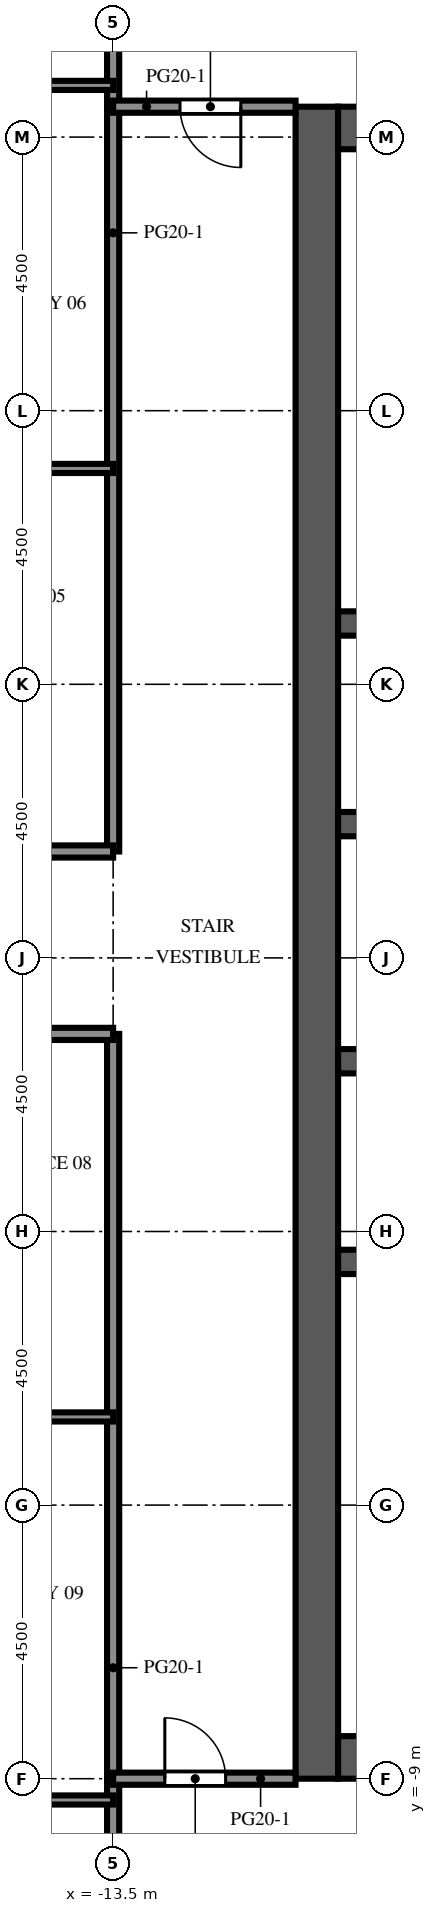
"""IFC4 building model, lengths in metres.
Left out: names, types, materials, properties, quantities, classifications, styles, units other than length and angle.
Written with IfcOpenShell. Run it as: python <this file> out.ifc"""

import sys

from ifc_helpers import new_model, si_unit, direction, frame, frame_2d, origin, place, context, subcontext, project, spatial, rectangle, extrude, element, fill, save


model = new_model("IFC4")
c1 = context("Model", 3, precision=1e-05, world=origin(), true_north=direction((0.0, 1.0)))
c2 = subcontext(c1, "Body", "Model", "MODEL_VIEW")
j1 = project(units=[si_unit("LENGTHUNIT", "METRE"), si_unit("PLANEANGLEUNIT", "RADIAN")], contexts=[c1])
p1 = place(None, origin())
s1 = spatial("IfcSite", under=j1, at=p1, CompositionType="ELEMENT")
p2 = place(p1, origin())
s2 = spatial("IfcBuilding", under=s1, at=p2, CompositionType="ELEMENT")
p3 = place(p2, frame((0.0, 0.0, 282.7)))
s3 = spatial("IfcBuildingStorey", under=s2, at=p3, CompositionType="ELEMENT", Elevation=282.7)
p4 = place(p3, frame((-10.15, -9.0, 0.0), z_axis=(0.0, 0.0, 1.0), x_axis=(0.0, 1.0, 0.0)))
e1 = element("IfcWall", 1, at=p4, inside=s3, PredefinedType="SHEAR", context=c2, shape_type="SweptSolid", body=[
    extrude(rectangle(XDim=27.5, YDim=0.7, at=frame_2d((13.75, 0.0))), origin(), (0.0, 0.0, 1.0), 4.1),
])
p5 = place(p4, frame((12.55, 0.0, 0.0)))
e2 = element("IfcOpeningElement", 2, at=p5, cuts=e1, PredefinedType="OPENING", context=c2, shape_type="SweptSolid", body=[
    extrude(rectangle(XDim=2.4, YDim=2.4, at=frame_2d((1.2, 1.2))), frame((0.0, 0.36, 0.0), z_axis=(0.0, -1.0, 0.0), x_axis=(1.0, 0.0, 0.0)), (0.0, 0.0, 1.0), 0.72),
])
p6 = place(p4, frame((6.825, 0.0, 0.0)))
e3 = element("IfcOpeningElement", 3, at=p6, cuts=e1, PredefinedType="OPENING", context=c2, shape_type="SweptSolid", body=[
    extrude(rectangle(XDim=1.2, YDim=2.1, at=frame_2d((0.6, 1.05))), frame((0.0, 0.36, 0.0), z_axis=(0.0, -1.0, 0.0), x_axis=(1.0, 0.0, 0.0)), (0.0, 0.0, 1.0), 0.72),
])
p7 = place(p4, frame((19.475, 0.0, 0.0)))
e4 = element("IfcOpeningElement", 4, at=p7, cuts=e1, PredefinedType="OPENING", context=c2, shape_type="SweptSolid", body=[
    extrude(rectangle(XDim=1.2, YDim=2.1, at=frame_2d((0.6, 1.05))), frame((0.0, 0.36, 0.0), z_axis=(0.0, -1.0, 0.0), x_axis=(1.0, 0.0, 0.0)), (0.0, 0.0, 1.0), 0.72),
])
for number, where, z_axis, x_axis in (
    (5, (-9.8, -8.65, 0.0), (0.0, 0.0, 1.0), (1.0, 0.0, 0.0)),
    (6, (-9.8, 18.15, 0.0), (0.0, 0.0, 1.0), (1.0, 0.0, 0.0)),
):
    element("IfcWall", number, at=place(p3, frame(where, z_axis=z_axis, x_axis=x_axis)), inside=s3, PredefinedType="SHEAR", context=c2, shape_type="SweptSolid", body=[
        extrude(rectangle(XDim=10.6, YDim=0.7, at=frame_2d((5.3, 0.0))), origin(), (0.0, 0.0, 1.0), 4.1),
    ])
p8 = place(p3, frame((-9.8, -0.5, 0.0), z_axis=(0.0, 0.0, 1.0), x_axis=(1.0, 0.0, 0.0)))
e7 = element("IfcWall", 7, at=p8, inside=s3, PredefinedType="SHEAR", context=c2, shape_type="SweptSolid", body=[
    extrude(rectangle(XDim=10.6, YDim=0.4, at=frame_2d((5.3, 0.0))), origin(), (0.0, 0.0, 1.0), 4.1),
])
p9 = place(p3, frame((-9.8, 2.8, 0.0), z_axis=(0.0, 0.0, 1.0), x_axis=(1.0, 0.0, 0.0)))
e8 = element("IfcWall", 8, at=p9, inside=s3, PredefinedType="SHEAR", context=c2, shape_type="SweptSolid", body=[
    extrude(rectangle(XDim=10.6, YDim=0.4, at=frame_2d((5.3, 0.0))), origin(), (0.0, 0.0, 1.0), 4.1),
])
p10 = place(p9, frame((0.688, 0.0, 0.0)))
e9 = element("IfcOpeningElement", 9, at=p10, cuts=e8, PredefinedType="OPENING", context=c2, shape_type="SweptSolid", body=[
    extrude(rectangle(XDim=1.1, YDim=2.1, at=frame_2d((0.55, 1.05))), frame((0.0, 0.21, 0.0), z_axis=(0.0, -1.0, 0.0), x_axis=(1.0, 0.0, 0.0)), (0.0, 0.0, 1.0), 0.42),
])
p11 = place(p9, frame((3.438, 0.0, 0.0)))
e10 = element("IfcOpeningElement", 10, at=p11, cuts=e8, PredefinedType="OPENING", context=c2, shape_type="SweptSolid", body=[
    extrude(rectangle(XDim=1.1, YDim=2.1, at=frame_2d((0.55, 1.05))), frame((0.0, 0.21, 0.0), z_axis=(0.0, -1.0, 0.0), x_axis=(1.0, 0.0, 0.0)), (0.0, 0.0, 1.0), 0.42),
])
p12 = place(p9, frame((6.113, 0.0, 0.0)))
e11 = element("IfcOpeningElement", 11, at=p12, cuts=e8, PredefinedType="OPENING", context=c2, shape_type="SweptSolid", body=[
    extrude(rectangle(XDim=1.0, YDim=2.1, at=frame_2d((0.5, 1.05))), frame((0.0, 0.21, 0.0), z_axis=(0.0, -1.0, 0.0), x_axis=(1.0, 0.0, 0.0)), (0.0, 0.0, 1.0), 0.42),
])
p13 = place(p9, frame((8.863, 0.0, 0.0)))
e12 = element("IfcOpeningElement", 12, at=p13, cuts=e8, PredefinedType="OPENING", context=c2, shape_type="SweptSolid", body=[
    extrude(rectangle(XDim=1.0, YDim=2.1, at=frame_2d((0.5, 1.05))), frame((0.0, 0.21, 0.0), z_axis=(0.0, -1.0, 0.0), x_axis=(1.0, 0.0, 0.0)), (0.0, 0.0, 1.0), 0.42),
])
p14 = place(p3, frame((-9.8, 6.7, 0.0), z_axis=(0.0, 0.0, 1.0), x_axis=(1.0, 0.0, 0.0)))
e13 = element("IfcWall", 13, at=p14, inside=s3, PredefinedType="SHEAR", context=c2, shape_type="SweptSolid", body=[
    extrude(rectangle(XDim=10.6, YDim=0.4, at=frame_2d((5.3, 0.0))), origin(), (0.0, 0.0, 1.0), 4.1),
])
p15 = place(p14, frame((3.438, 0.0, 0.0)))
e14 = element("IfcOpeningElement", 14, at=p15, cuts=e13, PredefinedType="OPENING", context=c2, shape_type="SweptSolid", body=[
    extrude(rectangle(XDim=1.1, YDim=2.1, at=frame_2d((0.55, 1.05))), frame((0.0, 0.21, 0.0), z_axis=(0.0, -1.0, 0.0), x_axis=(1.0, 0.0, 0.0)), (0.0, 0.0, 1.0), 0.42),
])
p16 = place(p14, frame((6.062, 0.0, 0.0)))
e15 = element("IfcOpeningElement", 15, at=p16, cuts=e13, PredefinedType="OPENING", context=c2, shape_type="SweptSolid", body=[
    extrude(rectangle(XDim=1.1, YDim=2.1, at=frame_2d((0.55, 1.05))), frame((0.0, 0.21, 0.0), z_axis=(0.0, -1.0, 0.0), x_axis=(1.0, 0.0, 0.0)), (0.0, 0.0, 1.0), 0.42),
])
p17 = place(p14, frame((8.812, 0.0, 0.0)))
e16 = element("IfcOpeningElement", 16, at=p17, cuts=e13, PredefinedType="OPENING", context=c2, shape_type="SweptSolid", body=[
    extrude(rectangle(XDim=1.1, YDim=2.1, at=frame_2d((0.55, 1.05))), frame((0.0, 0.21, 0.0), z_axis=(0.0, -1.0, 0.0), x_axis=(1.0, 0.0, 0.0)), (0.0, 0.0, 1.0), 0.42),
])
p18 = place(p14, frame((0.738, 0.0, 0.0)))
e17 = element("IfcOpeningElement", 17, at=p18, cuts=e13, PredefinedType="OPENING", context=c2, shape_type="SweptSolid", body=[
    extrude(rectangle(XDim=1.0, YDim=2.1, at=frame_2d((0.5, 1.05))), frame((0.0, 0.21, 0.0), z_axis=(0.0, -1.0, 0.0), x_axis=(1.0, 0.0, 0.0)), (0.0, 0.0, 1.0), 0.42),
])
p19 = place(p3, frame((-9.8, 10.0, 0.0), z_axis=(0.0, 0.0, 1.0), x_axis=(1.0, 0.0, 0.0)))
e18 = element("IfcWall", 18, at=p19, inside=s3, PredefinedType="SHEAR", context=c2, shape_type="SweptSolid", body=[
    extrude(rectangle(XDim=10.6, YDim=0.4, at=frame_2d((5.3, 0.0))), origin(), (0.0, 0.0, 1.0), 4.1),
])
p20 = place(p3, frame((-13.5, -17.6, 0.0), z_axis=(0.0, 0.0, 1.0), x_axis=(0.0, 1.0, 0.0)))
e19 = element("IfcWall", 19, at=p20, inside=s3, PredefinedType="PARTITIONING", context=c2, shape_type="SweptSolid", body=[
    extrude(rectangle(XDim=20.85, YDim=0.2, at=frame_2d((10.425, 0.0))), origin(), (0.0, 0.0, 1.0), 3.65),
])
p21 = place(p3, frame((-13.5, 6.25, 0.0), z_axis=(0.0, 0.0, 1.0), x_axis=(0.0, 1.0, 0.0)))
e20 = element("IfcWall", 20, at=p21, inside=s3, PredefinedType="PARTITIONING", context=c2, shape_type="SweptSolid", body=[
    extrude(rectangle(XDim=20.35, YDim=0.2, at=frame_2d((10.175, 0.0))), origin(), (0.0, 0.0, 1.0), 3.65),
])
p22 = place(p3, frame((-17.5, -9.35, 0.0), z_axis=(0.0, 0.0, 1.0), x_axis=(1.0, 0.0, 0.0)))
e21 = element("IfcWall", 21, at=p22, inside=s3, PredefinedType="PARTITIONING", context=c2, shape_type="SweptSolid", body=[
    extrude(rectangle(XDim=4.0, YDim=0.15, at=frame_2d((2.0, 0.0))), origin(), (0.0, 0.0, 1.0), 3.65),
])
p23 = place(p3, frame((-10.5, -9.0, 0.0), z_axis=(0.0, 0.0, 1.0), x_axis=(-1.0, 0.0, 0.0)))
e22 = element("IfcWall", 22, at=p23, inside=s3, PredefinedType="PARTITIONING", context=c2, shape_type="SweptSolid", body=[
    extrude(rectangle(XDim=3.0, YDim=0.2, at=frame_2d((1.5, 0.0))), origin(), (0.0, 0.0, 1.0), 3.65),
])
p24 = place(p23, frame((1.15, 0.0, 0.0)))
e23 = element("IfcOpeningElement", 23, at=p24, cuts=e22, PredefinedType="OPENING", context=c2, shape_type="SweptSolid", body=[
    extrude(rectangle(XDim=1.0, YDim=2.1, at=frame_2d((0.5, 1.05))), frame((0.0, 0.11, 0.0), z_axis=(0.0, -1.0, 0.0), x_axis=(1.0, 0.0, 0.0)), (0.0, 0.0, 1.0), 0.22),
])
p25 = place(p3, frame((-13.5, -3.05, 0.0), z_axis=(0.0, 0.0, 1.0), x_axis=(-1.0, 0.0, 0.0)))
e24 = element("IfcWall", 24, at=p25, inside=s3, PredefinedType="PARTITIONING", context=c2, shape_type="SweptSolid", body=[
    extrude(rectangle(XDim=8.85, YDim=0.15, at=frame_2d((4.425, 0.0))), origin(), (0.0, 0.0, 1.0), 3.65),
])
p26 = place(p25, frame((5.4, 0.0, 0.0)))
e25 = element("IfcOpeningElement", 25, at=p26, cuts=e24, PredefinedType="OPENING", context=c2, shape_type="SweptSolid", body=[
    extrude(rectangle(XDim=1.0, YDim=2.1, at=frame_2d((0.5, 1.05))), frame((0.0, 0.085, 0.0), z_axis=(0.0, -1.0, 0.0), x_axis=(1.0, 0.0, 0.0)), (0.0, 0.0, 1.0), 0.17),
])
p27 = place(p3, frame((-13.5, 3.25, 0.0), z_axis=(0.0, 0.0, 1.0), x_axis=(-1.0, 0.0, 0.0)))
e26 = element("IfcWall", 26, at=p27, inside=s3, PredefinedType="PARTITIONING", context=c2, shape_type="SweptSolid", body=[
    extrude(rectangle(XDim=8.85, YDim=0.2, at=frame_2d((4.425, 0.0))), origin(), (0.0, 0.0, 1.0), 3.65),
])
p28 = place(p27, frame((5.15, 0.0, 0.0)))
e27 = element("IfcOpeningElement", 27, at=p28, cuts=e26, PredefinedType="OPENING", context=c2, shape_type="SweptSolid", body=[
    extrude(rectangle(XDim=1.0, YDim=2.1, at=frame_2d((0.5, 1.05))), frame((0.0, 0.11, 0.0), z_axis=(0.0, -1.0, 0.0), x_axis=(1.0, 0.0, 0.0)), (0.0, 0.0, 1.0), 0.22),
])
p29 = place(p3, frame((-22.35, 6.25, 0.0), z_axis=(0.0, 0.0, 1.0), x_axis=(1.0, 0.0, 0.0)))
e28 = element("IfcWall", 28, at=p29, inside=s3, PredefinedType="PARTITIONING", context=c2, shape_type="SweptSolid", body=[
    extrude(rectangle(XDim=8.85, YDim=0.2, at=frame_2d((4.425, 0.0))), origin(), (0.0, 0.0, 1.0), 3.65),
])
p30 = place(p29, frame((3.45, 0.0, 0.0)))
e29 = element("IfcOpeningElement", 29, at=p30, cuts=e28, PredefinedType="OPENING", context=c2, shape_type="SweptSolid", body=[
    extrude(rectangle(XDim=1.0, YDim=2.1, at=frame_2d((0.5, 1.05))), frame((0.0, 0.11, 0.0), z_axis=(0.0, -1.0, 0.0), x_axis=(1.0, 0.0, 0.0)), (0.0, 0.0, 1.0), 0.22),
])
p31 = place(p3, frame((-22.35, 12.55, 0.0), z_axis=(0.0, 0.0, 1.0), x_axis=(1.0, 0.0, 0.0)))
e30 = element("IfcWall", 30, at=p31, inside=s3, PredefinedType="PARTITIONING", context=c2, shape_type="SweptSolid", body=[
    extrude(rectangle(XDim=8.85, YDim=0.15, at=frame_2d((4.425, 0.0))), origin(), (0.0, 0.0, 1.0), 3.65),
])
p32 = place(p31, frame((4.2, 0.0, 0.0)))
e31 = element("IfcOpeningElement", 31, at=p32, cuts=e30, PredefinedType="OPENING", context=c2, shape_type="SweptSolid", body=[
    extrude(rectangle(XDim=1.0, YDim=2.1, at=frame_2d((0.5, 1.05))), frame((0.0, 0.085, 0.0), z_axis=(0.0, -1.0, 0.0), x_axis=(1.0, 0.0, 0.0)), (0.0, 0.0, 1.0), 0.17),
])
p33 = place(p3, frame((-13.5, 18.5, 0.0), z_axis=(0.0, 0.0, 1.0), x_axis=(1.0, 0.0, 0.0)))
e32 = element("IfcWall", 32, at=p33, inside=s3, PredefinedType="PARTITIONING", context=c2, shape_type="SweptSolid", body=[
    extrude(rectangle(XDim=3.0, YDim=0.2, at=frame_2d((1.5, 0.0))), origin(), (0.0, 0.0, 1.0), 3.65),
])
p34 = place(p33, frame((1.1, 0.0, 0.0)))
e33 = element("IfcOpeningElement", 33, at=p34, cuts=e32, PredefinedType="OPENING", context=c2, shape_type="SweptSolid", body=[
    extrude(rectangle(XDim=1.0, YDim=2.1, at=frame_2d((0.5, 1.05))), frame((0.0, 0.11, 0.0), z_axis=(0.0, -1.0, 0.0), x_axis=(1.0, 0.0, 0.0)), (0.0, 0.0, 1.0), 0.22),
])
p35 = place(p3, frame((-22.35, 18.85, 0.0), z_axis=(0.0, 0.0, 1.0), x_axis=(1.0, 0.0, 0.0)))
e34 = element("IfcWall", 34, at=p35, inside=s3, PredefinedType="PARTITIONING", context=c2, shape_type="SweptSolid", body=[
    extrude(rectangle(XDim=8.85, YDim=0.15, at=frame_2d((4.425, 0.0))), origin(), (0.0, 0.0, 1.0), 3.65),
])
p36 = place(p35, frame((2.7, 0.0, 0.0)))
e35 = element("IfcOpeningElement", 35, at=p36, cuts=e34, PredefinedType="OPENING", context=c2, shape_type="SweptSolid", body=[
    extrude(rectangle(XDim=1.0, YDim=2.1, at=frame_2d((0.5, 1.05))), frame((0.0, 0.085, 0.0), z_axis=(0.0, -1.0, 0.0), x_axis=(1.0, 0.0, 0.0)), (0.0, 0.0, 1.0), 0.17),
])
p37 = place(p5, origin())
e36 = element("IfcDoor", 36, at=p37, inside=s3, OperationType="DOUBLE_DOOR_DOUBLE_SWING", PredefinedType="DOOR", context=c2, shape_type="SweptSolid", body=[
    extrude(rectangle(XDim=2.4, YDim=2.4, at=frame_2d((1.2, 1.2))), frame((0.0, 0.025, 0.0), z_axis=(0.0, -1.0, 0.0), x_axis=(1.0, 0.0, 0.0)), (0.0, 0.0, 1.0), 0.05),
])
fill(e2, e36)
p38 = place(p6, origin())
e37 = element("IfcDoor", 37, at=p38, inside=s3, OperationType="SINGLE_SWING_LEFT", PredefinedType="DOOR", context=c2, shape_type="SweptSolid", body=[
    extrude(rectangle(XDim=1.2, YDim=2.1, at=frame_2d((0.6, 1.05))), frame((0.0, 0.025, 0.0), z_axis=(0.0, -1.0, 0.0), x_axis=(1.0, 0.0, 0.0)), (0.0, 0.0, 1.0), 0.05),
])
fill(e3, e37)
p39 = place(p7, origin())
e38 = element("IfcDoor", 38, at=p39, inside=s3, OperationType="SINGLE_SWING_LEFT", PredefinedType="DOOR", context=c2, shape_type="SweptSolid", body=[
    extrude(rectangle(XDim=1.2, YDim=2.1, at=frame_2d((0.6, 1.05))), frame((0.0, 0.025, 0.0), z_axis=(0.0, -1.0, 0.0), x_axis=(1.0, 0.0, 0.0)), (0.0, 0.0, 1.0), 0.05),
])
fill(e4, e38)
p40 = place(p24, origin())
e39 = element("IfcDoor", 39, at=p40, inside=s3, OperationType="SINGLE_SWING_RIGHT", PredefinedType="DOOR", context=c2, shape_type="SweptSolid", body=[
    extrude(rectangle(XDim=1.0, YDim=2.1, at=frame_2d((0.5, 1.05))), frame((0.0, 0.025, 0.0), z_axis=(0.0, -1.0, 0.0), x_axis=(1.0, 0.0, 0.0)), (0.0, 0.0, 1.0), 0.05),
])
fill(e23, e39)
p41 = place(p34, origin())
e40 = element("IfcDoor", 40, at=p41, inside=s3, OperationType="SINGLE_SWING_RIGHT", PredefinedType="DOOR", context=c2, shape_type="SweptSolid", body=[
    extrude(rectangle(XDim=1.0, YDim=2.1, at=frame_2d((0.5, 1.05))), frame((0.0, 0.025, 0.0), z_axis=(0.0, -1.0, 0.0), x_axis=(1.0, 0.0, 0.0)), (0.0, 0.0, 1.0), 0.05),
])
fill(e33, e40)
save(model, sys.argv[1])
